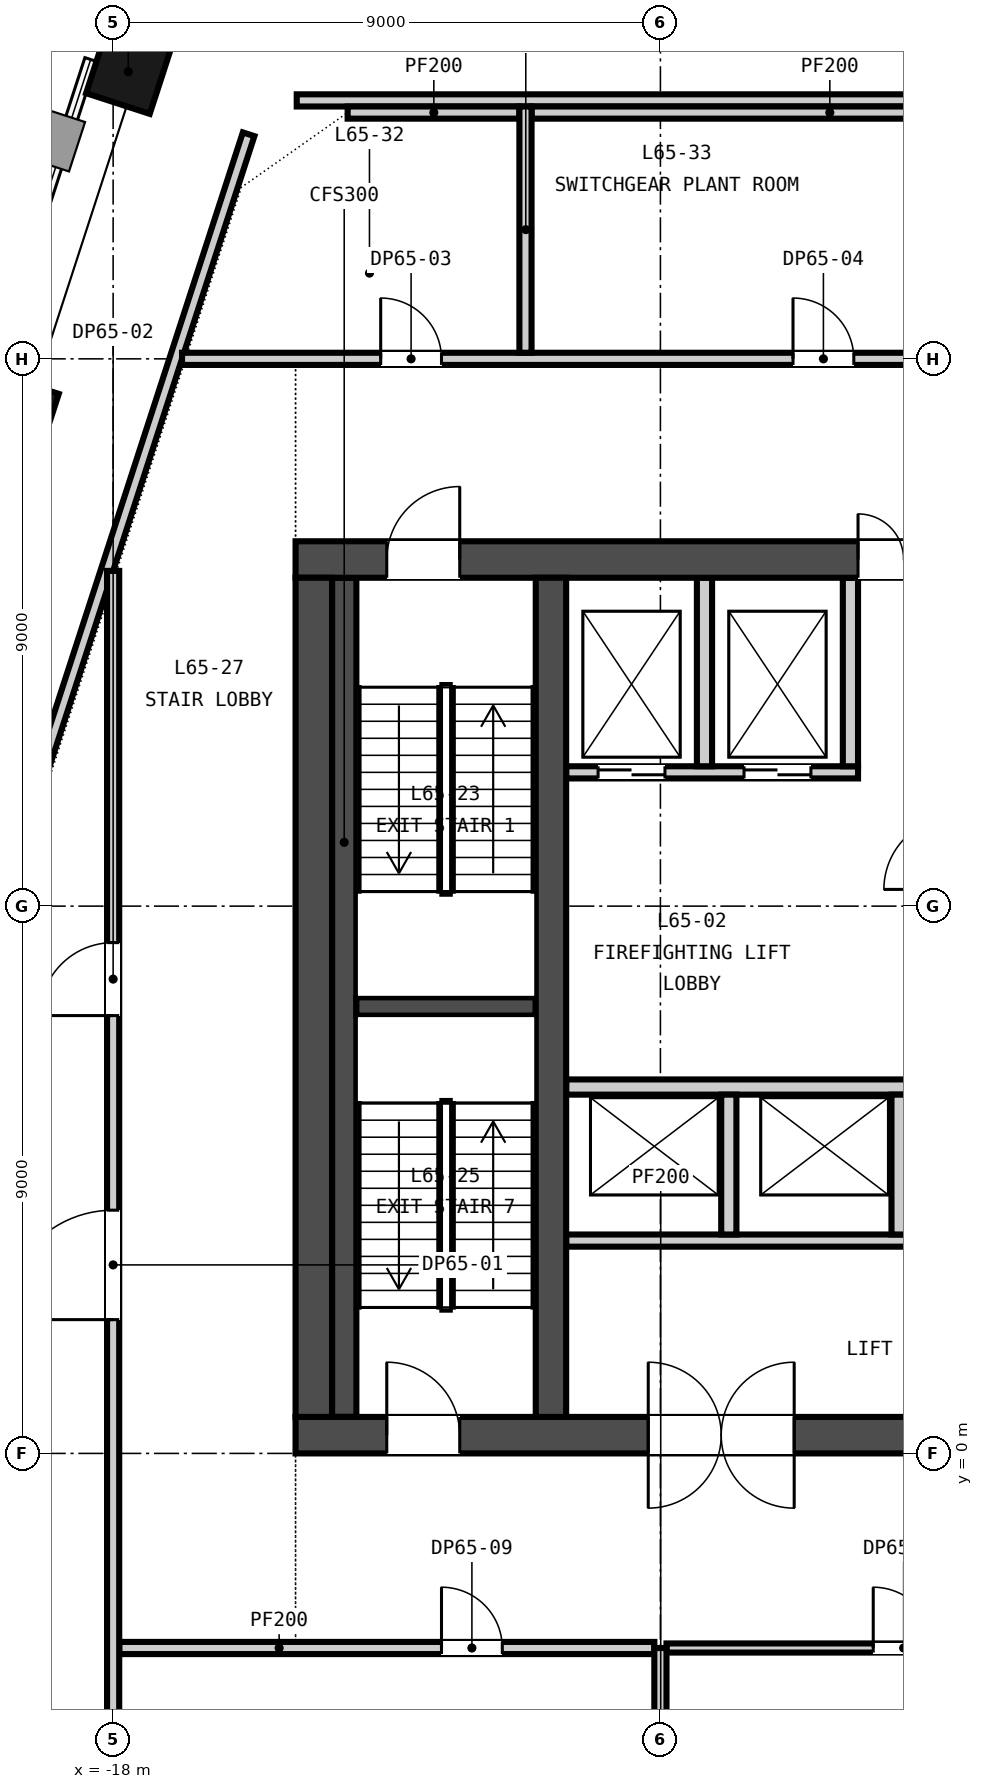
"""IFC4 building model, lengths in metres.
Left out: names, types, materials, properties, quantities, classifications, styles, units other than length and angle.
Written with IfcOpenShell. Run it as: python <this file> out.ifc"""

import sys

from ifc_helpers import new_model, si_unit, direction, frame, frame_2d, origin, origin_2d, place, context, subcontext, project, spatial, rectangle, extrude, element, fill, save


model = new_model("IFC4")
c1 = context("Model", 3, precision=1e-05, world=origin(), true_north=direction((0.0, 1.0)))
c2 = subcontext(c1, "Body", "Model", "MODEL_VIEW")
j1 = project(units=[si_unit("LENGTHUNIT", "METRE"), si_unit("PLANEANGLEUNIT", "RADIAN")], contexts=[c1])
p1 = place(None, origin())
s1 = spatial("IfcSite", under=j1, at=p1, CompositionType="ELEMENT")
p2 = place(p1, origin())
s2 = spatial("IfcBuilding", under=s1, at=p2, CompositionType="ELEMENT")
p3 = place(p2, frame((0.0, 0.0, 256.45)))
s3 = spatial("IfcBuildingStorey", under=s2, at=p3, CompositionType="ELEMENT", Elevation=256.45)
p4 = place(p3, frame((-15.0, 0.3, -0.3), z_axis=(0.0, 0.0, 1.0), x_axis=(1.0, 0.0, 0.0)))
e1 = element("IfcWall", 1, at=p4, inside=s3, PredefinedType="SOLIDWALL", context=c2, shape_type="SweptSolid", body=[
    extrude(rectangle(XDim=30.0, YDim=0.6, at=frame_2d((15.0, 0.0))), origin(), (0.0, 0.0, 1.0), 4.65),
])
p5 = place(p4, frame((5.8, 0.0, 0.3)))
e2 = element("IfcOpeningElement", 2, at=p5, cuts=e1, PredefinedType="OPENING", context=c2, shape_type="SweptSolid", body=[
    extrude(rectangle(XDim=2.4, YDim=2.4, at=frame_2d((1.2, 1.2))), frame((0.0, 0.31, 0.0), z_axis=(0.0, -1.0, 0.0), x_axis=(1.0, 0.0, 0.0)), (0.0, 0.0, 1.0), 0.62),
])
p6 = place(p4, frame((13.8, 0.0, 0.3)))
e3 = element("IfcOpeningElement", 3, at=p6, cuts=e1, PredefinedType="OPENING", context=c2, shape_type="SweptSolid", body=[
    extrude(rectangle(XDim=2.4, YDim=2.4, at=frame_2d((1.2, 1.2))), frame((0.0, 0.31, 0.0), z_axis=(0.0, -1.0, 0.0), x_axis=(1.0, 0.0, 0.0)), (0.0, 0.0, 1.0), 0.62),
])
p7 = place(p4, frame((21.8, 0.0, 0.3)))
e4 = element("IfcOpeningElement", 4, at=p7, cuts=e1, PredefinedType="OPENING", context=c2, shape_type="SweptSolid", body=[
    extrude(rectangle(XDim=2.4, YDim=2.4, at=frame_2d((1.2, 1.2))), frame((0.0, 0.31, 0.0), z_axis=(0.0, -1.0, 0.0), x_axis=(1.0, 0.0, 0.0)), (0.0, 0.0, 1.0), 0.62),
])
p8 = place(p4, frame((1.5, 0.0, 0.3)))
e5 = element("IfcOpeningElement", 5, at=p8, cuts=e1, PredefinedType="OPENING", context=c2, shape_type="SweptSolid", body=[
    extrude(rectangle(XDim=1.2, YDim=2.1, at=frame_2d((0.6, 1.05))), frame((0.0, 0.31, 0.0), z_axis=(0.0, -1.0, 0.0), x_axis=(1.0, 0.0, 0.0)), (0.0, 0.0, 1.0), 0.62),
])
p9 = place(p4, frame((27.3, 0.0, 0.3)))
e6 = element("IfcOpeningElement", 6, at=p9, cuts=e1, PredefinedType="OPENING", context=c2, shape_type="SweptSolid", body=[
    extrude(rectangle(XDim=1.2, YDim=2.1, at=frame_2d((0.6, 1.05))), frame((0.0, 0.31, 0.0), z_axis=(0.0, -1.0, 0.0), x_axis=(1.0, 0.0, 0.0)), (0.0, 0.0, 1.0), 0.62),
])
p10 = place(p3, frame((-15.0, 14.7, -0.3), z_axis=(0.0, 0.0, 1.0), x_axis=(1.0, 0.0, 0.0)))
e7 = element("IfcWall", 7, at=p10, inside=s3, PredefinedType="SOLIDWALL", context=c2, shape_type="SweptSolid", body=[
    extrude(rectangle(XDim=30.0, YDim=0.6, at=frame_2d((15.0, 0.0))), origin(), (0.0, 0.0, 1.0), 4.65),
])
p11 = place(p10, frame((9.25, 0.0, 0.3)))
e8 = element("IfcOpeningElement", 8, at=p11, cuts=e7, PredefinedType="OPENING", context=c2, shape_type="SweptSolid", body=[
    extrude(rectangle(XDim=1.5, YDim=2.1, at=frame_2d((0.75, 1.05))), frame((0.0, 0.31, 0.0), z_axis=(0.0, -1.0, 0.0), x_axis=(1.0, 0.0, 0.0)), (0.0, 0.0, 1.0), 0.62),
])
p12 = place(p10, frame((19.4, 0.0, 0.3)))
e9 = element("IfcOpeningElement", 9, at=p12, cuts=e7, PredefinedType="OPENING", context=c2, shape_type="SweptSolid", body=[
    extrude(rectangle(XDim=1.5, YDim=2.1, at=frame_2d((0.75, 1.05))), frame((0.0, 0.31, 0.0), z_axis=(0.0, -1.0, 0.0), x_axis=(1.0, 0.0, 0.0)), (0.0, 0.0, 1.0), 0.62),
])
p13 = place(p10, frame((1.5, 0.0, 0.3)))
e10 = element("IfcOpeningElement", 10, at=p13, cuts=e7, PredefinedType="OPENING", context=c2, shape_type="SweptSolid", body=[
    extrude(rectangle(XDim=1.2, YDim=2.1, at=frame_2d((0.6, 1.05))), frame((0.0, 0.31, 0.0), z_axis=(0.0, -1.0, 0.0), x_axis=(1.0, 0.0, 0.0)), (0.0, 0.0, 1.0), 0.62),
])
p14 = place(p10, frame((27.3, 0.0, 0.3)))
e11 = element("IfcOpeningElement", 11, at=p14, cuts=e7, PredefinedType="OPENING", context=c2, shape_type="SweptSolid", body=[
    extrude(rectangle(XDim=1.2, YDim=2.1, at=frame_2d((0.6, 1.05))), frame((0.0, 0.31, 0.0), z_axis=(0.0, -1.0, 0.0), x_axis=(1.0, 0.0, 0.0)), (0.0, 0.0, 1.0), 0.62),
])
p15 = place(p3, frame((-14.7, 0.6, -0.3), z_axis=(0.0, 0.0, 1.0), x_axis=(0.0, 1.0, 0.0)))
e12 = element("IfcWall", 12, at=p15, inside=s3, PredefinedType="SOLIDWALL", context=c2, shape_type="SweptSolid", body=[
    extrude(rectangle(XDim=13.8, YDim=0.6, at=frame_2d((6.9, 0.0))), origin(), (0.0, 0.0, 1.0), 4.65),
])
p16 = place(p3, frame((-10.8, 0.6, -0.3), z_axis=(0.0, 0.0, 1.0), x_axis=(0.0, 1.0, 0.0)))
e13 = element("IfcWall", 13, at=p16, inside=s3, PredefinedType="SOLIDWALL", context=c2, shape_type="SweptSolid", body=[
    extrude(rectangle(XDim=13.8, YDim=0.5, at=frame_2d((6.9, 0.0))), origin(), (0.0, 0.0, 1.0), 4.65),
])
for number, where, z_axis, x_axis in (
    (14, (-17.751, 22.722, -0.3), (0.0, 0.0, 1.0), (-0.309, -0.951, 0.0)),
    (15, (-19.587, 17.071, -0.3), (0.0, 0.0, 1.0), (-0.309, -0.951, 0.0)),
):
    element("IfcColumn", number, at=place(p3, frame(where, z_axis=z_axis, x_axis=x_axis)), inside=s3, PredefinedType="COLUMN", context=c2, shape_type="SweptSolid", body=[
        extrude(rectangle(XDim=1.1, YDim=1.1, at=origin_2d()), origin(), (0.0, 0.0, 1.0), 4.65),
    ])
p17 = place(p3, frame((-10.55, 3.5, 0.0), z_axis=(0.0, 0.0, 1.0), x_axis=(1.0, 0.0, 0.0)))
e16 = element("IfcWall", 16, at=p17, inside=s3, PredefinedType="PARTITIONING", context=c2, shape_type="SweptSolid", body=[
    extrude(rectangle(XDim=21.1, YDim=0.2, at=frame_2d((10.55, 0.0))), origin(), (0.0, 0.0, 1.0), 4.35),
])
p18 = place(p17, frame((19.9, 0.0, 0.0)))
e17 = element("IfcOpeningElement", 17, at=p18, cuts=e16, PredefinedType="OPENING", context=c2, shape_type="SweptSolid", body=[
    extrude(rectangle(XDim=0.9, YDim=2.1, at=frame_2d((0.45, 1.05))), frame((0.0, 0.11, 0.0), z_axis=(0.0, -1.0, 0.0), x_axis=(1.0, 0.0, 0.0)), (0.0, 0.0, 1.0), 0.22),
])
p19 = place(p3, frame((-10.55, 6.025, 0.0), z_axis=(0.0, 0.0, 1.0), x_axis=(1.0, 0.0, 0.0)))
e18 = element("IfcWall", 18, at=p19, inside=s3, PredefinedType="PARTITIONING", context=c2, shape_type="SweptSolid", body=[
    extrude(rectangle(XDim=21.1, YDim=0.25, at=frame_2d((10.55, 0.0))), origin(), (0.0, 0.0, 1.0), 4.35),
])
p20 = place(p3, frame((-10.55, 11.2, 0.0), z_axis=(0.0, 0.0, 1.0), x_axis=(1.0, 0.0, 0.0)))
e19 = element("IfcWall", 19, at=p20, inside=s3, PredefinedType="PARTITIONING", context=c2, shape_type="SweptSolid", body=[
    extrude(rectangle(XDim=4.8, YDim=0.2, at=frame_2d((2.4, 0.0))), origin(), (0.0, 0.0, 1.0), 4.35),
])
p21 = place(p20, frame((0.525, 0.0, 0.0)))
e20 = element("IfcOpeningElement", 20, at=p21, cuts=e19, PredefinedType="OPENING", context=c2, shape_type="SweptSolid", body=[
    extrude(rectangle(XDim=1.1, YDim=2.1, at=frame_2d((0.55, 1.05))), frame((0.0, 0.11, 0.0), z_axis=(0.0, -1.0, 0.0), x_axis=(1.0, 0.0, 0.0)), (0.0, 0.0, 1.0), 0.22),
])
p22 = place(p20, frame((2.925, 0.0, 0.0)))
e21 = element("IfcOpeningElement", 21, at=p22, cuts=e19, PredefinedType="OPENING", context=c2, shape_type="SweptSolid", body=[
    extrude(rectangle(XDim=1.1, YDim=2.1, at=frame_2d((0.55, 1.05))), frame((0.0, 0.11, 0.0), z_axis=(0.0, -1.0, 0.0), x_axis=(1.0, 0.0, 0.0)), (0.0, 0.0, 1.0), 0.22),
])
for number, where, z_axis, x_axis in (
    (22, (-7.875, 3.6, 0.0), (0.0, 0.0, 1.0), (0.0, 1.0, 0.0)),
    (23, (-5.075, 3.6, 0.0), (0.0, 0.0, 1.0), (0.0, 1.0, 0.0)),
):
    element("IfcWall", number, at=place(p3, frame(where, z_axis=z_axis, x_axis=x_axis)), inside=s3, PredefinedType="PARTITIONING", context=c2, shape_type="SweptSolid", body=[
        extrude(rectangle(XDim=2.3, YDim=0.25, at=frame_2d((1.15, 0.0))), origin(), (0.0, 0.0, 1.0), 4.35),
    ])
for number, where, z_axis, x_axis in (
    (24, (-8.275, 11.3, 0.0), (0.0, 0.0, 1.0), (0.0, 1.0, 0.0)),
    (25, (-5.875, 11.3, 0.0), (0.0, 0.0, 1.0), (0.0, 1.0, 0.0)),
):
    element("IfcWall", number, at=place(p3, frame(where, z_axis=z_axis, x_axis=x_axis)), inside=s3, PredefinedType="PARTITIONING", context=c2, shape_type="SweptSolid", body=[
        extrude(rectangle(XDim=3.1, YDim=0.25, at=frame_2d((1.55, 0.0))), origin(), (0.0, 0.0, 1.0), 4.35),
    ])
p23 = place(p3, frame((-14.0, 7.35, 0.0), z_axis=(0.0, 0.0, 1.0), x_axis=(1.0, 0.0, 0.0)))
e26 = element("IfcWall", 26, at=p23, inside=s3, PredefinedType="SOLIDWALL", context=c2, shape_type="SweptSolid", body=[
    extrude(rectangle(XDim=2.95, YDim=0.3, at=frame_2d((1.475, 0.0))), origin(), (0.0, 0.0, 1.0), 4.35),
])
p24 = place(p3, frame((-14.2, 0.6, 0.0), z_axis=(0.0, 0.0, 1.0), x_axis=(0.0, 1.0, 0.0)))
e27 = element("IfcWall", 27, at=p24, inside=s3, PredefinedType="SOLIDWALL", context=c2, shape_type="SweptSolid", body=[
    extrude(rectangle(XDim=13.8, YDim=0.4, at=frame_2d((6.9, 0.0))), origin(), (0.0, 0.0, 1.0), 4.35),
])
p25 = place(p3, frame((-17.9, -3.2, 0.0), z_axis=(0.0, 0.0, 1.0), x_axis=(1.0, 0.0, 0.0)))
e28 = element("IfcWall", 28, at=p25, inside=s3, PredefinedType="PARTITIONING", context=c2, shape_type="SweptSolid", body=[
    extrude(rectangle(XDim=8.8, YDim=0.2, at=frame_2d((4.4, 0.0))), origin(), (0.0, 0.0, 1.0), 4.35),
])
p26 = place(p25, frame((5.3, 0.0, 0.0)))
e29 = element("IfcOpeningElement", 29, at=p26, cuts=e28, PredefinedType="OPENING", context=c2, shape_type="SweptSolid", body=[
    extrude(rectangle(XDim=1.0, YDim=2.1, at=frame_2d((0.5, 1.05))), frame((0.0, 0.11, 0.0), z_axis=(0.0, -1.0, 0.0), x_axis=(1.0, 0.0, 0.0)), (0.0, 0.0, 1.0), 0.22),
])
p27 = place(p3, frame((-8.9, -3.2, 0.0), z_axis=(0.0, 0.0, 1.0), x_axis=(1.0, 0.0, 0.0)))
e30 = element("IfcWall", 30, at=p27, inside=s3, PredefinedType="PARTITIONING", context=c2, shape_type="SweptSolid", body=[
    extrude(rectangle(XDim=17.8, YDim=0.15, at=frame_2d((8.9, 0.0))), origin(), (0.0, 0.0, 1.0), 4.35),
])
p28 = place(p27, frame((3.4, 0.0, 0.0)))
e31 = element("IfcOpeningElement", 31, at=p28, cuts=e30, PredefinedType="OPENING", context=c2, shape_type="SweptSolid", body=[
    extrude(rectangle(XDim=1.0, YDim=2.1, at=frame_2d((0.5, 1.05))), frame((0.0, 0.085, 0.0), z_axis=(0.0, -1.0, 0.0), x_axis=(1.0, 0.0, 0.0)), (0.0, 0.0, 1.0), 0.17),
])
p29 = place(p27, frame((12.3, 0.0, 0.0)))
e32 = element("IfcOpeningElement", 32, at=p29, cuts=e30, PredefinedType="OPENING", context=c2, shape_type="SweptSolid", body=[
    extrude(rectangle(XDim=1.0, YDim=2.1, at=frame_2d((0.5, 1.05))), frame((0.0, 0.085, 0.0), z_axis=(0.0, -1.0, 0.0), x_axis=(1.0, 0.0, 0.0)), (0.0, 0.0, 1.0), 0.17),
])
p30 = place(p3, frame((-16.867, 18.0, 0.0), z_axis=(0.0, 0.0, 1.0), x_axis=(1.0, 0.0, 0.0)))
e33 = element("IfcWall", 33, at=p30, inside=s3, PredefinedType="PARTITIONING", context=c2, shape_type="SweptSolid", body=[
    extrude(rectangle(XDim=29.73, YDim=0.2, at=frame_2d((14.865, 0.0))), origin(), (0.0, 0.0, 1.0), 4.35),
])
p31 = place(p30, frame((3.267, 0.0, 0.0)))
e34 = element("IfcOpeningElement", 34, at=p31, cuts=e33, PredefinedType="OPENING", context=c2, shape_type="SweptSolid", body=[
    extrude(rectangle(XDim=1.0, YDim=2.1, at=frame_2d((0.5, 1.05))), frame((0.0, 0.11, 0.0), z_axis=(0.0, -1.0, 0.0), x_axis=(1.0, 0.0, 0.0)), (0.0, 0.0, 1.0), 0.22),
])
p32 = place(p30, frame((10.048, 0.0, 0.0)))
e35 = element("IfcOpeningElement", 35, at=p32, cuts=e33, PredefinedType="OPENING", context=c2, shape_type="SweptSolid", body=[
    extrude(rectangle(XDim=1.0, YDim=2.1, at=frame_2d((0.5, 1.05))), frame((0.0, 0.11, 0.0), z_axis=(0.0, -1.0, 0.0), x_axis=(1.0, 0.0, 0.0)), (0.0, 0.0, 1.0), 0.22),
])
p33 = place(p30, frame((22.048, 0.0, 0.0)))
e36 = element("IfcOpeningElement", 36, at=p33, cuts=e33, PredefinedType="OPENING", context=c2, shape_type="SweptSolid", body=[
    extrude(rectangle(XDim=1.0, YDim=2.1, at=frame_2d((0.5, 1.05))), frame((0.0, 0.11, 0.0), z_axis=(0.0, -1.0, 0.0), x_axis=(1.0, 0.0, 0.0)), (0.0, 0.0, 1.0), 0.22),
])
p34 = place(p3, frame((-14.143, 22.05, 0.0), z_axis=(0.0, 0.0, 1.0), x_axis=(1.0, 0.0, 0.0)))
e37 = element("IfcWall", 37, at=p34, inside=s3, PredefinedType="PARTITIONING", context=c2, shape_type="SweptSolid", body=[
    extrude(rectangle(XDim=2.824, YDim=0.2, at=frame_2d((1.412, 0.0))), origin(), (0.0, 0.0, 1.0), 4.35),
])
p35 = place(p3, frame((-11.119, 22.05, 0.0), z_axis=(0.0, 0.0, 1.0), x_axis=(1.0, 0.0, 0.0)))
e38 = element("IfcWall", 38, at=p35, inside=s3, PredefinedType="PARTITIONING", context=c2, shape_type="SweptSolid", body=[
    extrude(rectangle(XDim=9.8, YDim=0.2, at=frame_2d((4.9, 0.0))), origin(), (0.0, 0.0, 1.0), 4.35),
])
p36 = place(p3, frame((-18.0, -13.123, 0.0), z_axis=(0.0, 0.0, 1.0), x_axis=(0.0, 1.0, 0.0)))
e39 = element("IfcWall", 39, at=p36, inside=s3, PredefinedType="PARTITIONING", context=c2, shape_type="SweptSolid", body=[
    extrude(rectangle(XDim=27.636, YDim=0.2, at=frame_2d((13.818, 0.0))), origin(), (0.0, 0.0, 1.0), 4.35),
])
p37 = place(p36, frame((15.323, 0.0, 0.0)))
e40 = element("IfcOpeningElement", 40, at=p37, cuts=e39, PredefinedType="OPENING", context=c2, shape_type="SweptSolid", body=[
    extrude(rectangle(XDim=1.8, YDim=2.4, at=frame_2d((0.9, 1.2))), frame((0.0, 0.11, 0.0), z_axis=(0.0, -1.0, 0.0), x_axis=(1.0, 0.0, 0.0)), (0.0, 0.0, 1.0), 0.22),
])
p38 = place(p36, frame((20.323, 0.0, 0.0)))
e41 = element("IfcOpeningElement", 41, at=p38, cuts=e39, PredefinedType="OPENING", context=c2, shape_type="SweptSolid", body=[
    extrude(rectangle(XDim=1.2, YDim=2.1, at=frame_2d((0.6, 1.05))), frame((0.0, 0.11, 0.0), z_axis=(0.0, -1.0, 0.0), x_axis=(1.0, 0.0, 0.0)), (0.0, 0.0, 1.0), 0.22),
])
p39 = place(p3, frame((-11.219, 18.1, 0.0), z_axis=(0.0, 0.0, 1.0), x_axis=(0.0, 1.0, 0.0)))
e42 = element("IfcWall", 42, at=p39, inside=s3, PredefinedType="PARTITIONING", context=c2, shape_type="SweptSolid", body=[
    extrude(rectangle(XDim=4.05, YDim=0.2, at=frame_2d((2.025, 0.0))), origin(), (0.0, 0.0, 1.0), 4.35),
])
p40 = place(p3, frame((-9.0, -9.0, 0.0), z_axis=(0.0, 0.0, 1.0), x_axis=(0.0, 1.0, 0.0)))
e43 = element("IfcWall", 43, at=p40, inside=s3, PredefinedType="PARTITIONING", context=c2, shape_type="SweptSolid", body=[
    extrude(rectangle(XDim=5.8, YDim=0.2, at=frame_2d((2.9, 0.0))), origin(), (0.0, 0.0, 1.0), 4.35),
])
p41 = place(p3, frame((-23.322, -1.542, 0.0), z_axis=(0.0, 0.0, 1.0), x_axis=(0.30902054225, 0.951055363513, 0.0)))
e44 = element("IfcWall", 44, at=p41, inside=s3, PredefinedType="PARTITIONING", context=c2, shape_type="SweptSolid", body=[
    extrude(rectangle(XDim=24.431, YDim=0.2, at=frame_2d((12.215, 0.0))), origin(), (0.0, 0.0, 1.0), 4.35),
])
p42 = place(p3, frame((-14.981, 22.25, 0.0), z_axis=(0.0, 0.0, 1.0), x_axis=(1.0, 0.0, 0.0)))
e45 = element("IfcWall", 45, at=p42, inside=s3, PredefinedType="PARTITIONING", context=c2, shape_type="SweptSolid", body=[
    extrude(rectangle(XDim=22.223, YDim=0.2, at=frame_2d((11.111, 0.0))), origin(), (0.0, 0.0, 1.0), 4.35),
])
p43 = place(p21, origin())
e46 = element("IfcDoor", 46, at=p43, inside=s3, OperationType="DOUBLE_DOOR_SLIDING", PredefinedType="DOOR", context=c2, shape_type="SweptSolid", body=[
    extrude(rectangle(XDim=1.1, YDim=2.1, at=frame_2d((0.55, 1.05))), frame((0.0, 0.025, 0.0), z_axis=(0.0, -1.0, 0.0), x_axis=(1.0, 0.0, 0.0)), (0.0, 0.0, 1.0), 0.05),
])
fill(e20, e46)
p44 = place(p22, origin())
e47 = element("IfcDoor", 47, at=p44, inside=s3, OperationType="DOUBLE_DOOR_SLIDING", PredefinedType="DOOR", context=c2, shape_type="SweptSolid", body=[
    extrude(rectangle(XDim=1.1, YDim=2.1, at=frame_2d((0.55, 1.05))), frame((0.0, 0.025, 0.0), z_axis=(0.0, -1.0, 0.0), x_axis=(1.0, 0.0, 0.0)), (0.0, 0.0, 1.0), 0.05),
])
fill(e21, e47)
p45 = place(p5, origin())
e48 = element("IfcDoor", 48, at=p45, inside=s3, OperationType="DOUBLE_DOOR_DOUBLE_SWING", PredefinedType="DOOR", context=c2, shape_type="SweptSolid", body=[
    extrude(rectangle(XDim=2.4, YDim=2.4, at=frame_2d((1.2, 1.2))), frame((0.0, 0.025, 0.0), z_axis=(0.0, -1.0, 0.0), x_axis=(1.0, 0.0, 0.0)), (0.0, 0.0, 1.0), 0.05),
])
fill(e2, e48)
p46 = place(p11, origin())
e49 = element("IfcDoor", 49, at=p46, inside=s3, OperationType="DOUBLE_DOOR_SINGLE_SWING", PredefinedType="DOOR", context=c2, shape_type="SweptSolid", body=[
    extrude(rectangle(XDim=1.5, YDim=2.1, at=frame_2d((0.75, 1.05))), frame((0.0, 0.025, 0.0), z_axis=(0.0, -1.0, 0.0), x_axis=(1.0, 0.0, 0.0)), (0.0, 0.0, 1.0), 0.05),
])
fill(e8, e49)
p47 = place(p13, origin())
e50 = element("IfcDoor", 50, at=p47, inside=s3, OperationType="SINGLE_SWING_RIGHT", PredefinedType="DOOR", context=c2, shape_type="SweptSolid", body=[
    extrude(rectangle(XDim=1.2, YDim=2.1, at=frame_2d((0.6, 1.05))), frame((0.0, 0.025, 0.0), z_axis=(0.0, -1.0, 0.0), x_axis=(1.0, 0.0, 0.0)), (0.0, 0.0, 1.0), 0.05),
])
fill(e10, e50)
p48 = place(p8, origin())
e51 = element("IfcDoor", 51, at=p48, inside=s3, OperationType="SINGLE_SWING_LEFT", PredefinedType="DOOR", context=c2, shape_type="SweptSolid", body=[
    extrude(rectangle(XDim=1.2, YDim=2.1, at=frame_2d((0.6, 1.05))), frame((0.0, 0.025, 0.0), z_axis=(0.0, -1.0, 0.0), x_axis=(1.0, 0.0, 0.0)), (0.0, 0.0, 1.0), 0.05),
])
fill(e5, e51)
p49 = place(p37, origin())
e52 = element("IfcDoor", 52, at=p49, inside=s3, OperationType="SINGLE_SWING_LEFT", PredefinedType="DOOR", context=c2, shape_type="SweptSolid", body=[
    extrude(rectangle(XDim=1.8, YDim=2.4, at=frame_2d((0.9, 1.2))), frame((0.0, 0.025, 0.0), z_axis=(0.0, -1.0, 0.0), x_axis=(1.0, 0.0, 0.0)), (0.0, 0.0, 1.0), 0.05),
])
fill(e40, e52)
p50 = place(p38, origin())
e53 = element("IfcDoor", 53, at=p50, inside=s3, OperationType="SINGLE_SWING_LEFT", PredefinedType="DOOR", context=c2, shape_type="SweptSolid", body=[
    extrude(rectangle(XDim=1.2, YDim=2.1, at=frame_2d((0.6, 1.05))), frame((0.0, 0.025, 0.0), z_axis=(0.0, -1.0, 0.0), x_axis=(1.0, 0.0, 0.0)), (0.0, 0.0, 1.0), 0.05),
])
fill(e41, e53)
p51 = place(p31, origin())
e54 = element("IfcDoor", 54, at=p51, inside=s3, OperationType="SINGLE_SWING_LEFT", PredefinedType="DOOR", context=c2, shape_type="SweptSolid", body=[
    extrude(rectangle(XDim=1.0, YDim=2.1, at=frame_2d((0.5, 1.05))), frame((0.0, 0.025, 0.0), z_axis=(0.0, -1.0, 0.0), x_axis=(1.0, 0.0, 0.0)), (0.0, 0.0, 1.0), 0.05),
])
fill(e34, e54)
p52 = place(p32, origin())
e55 = element("IfcDoor", 55, at=p52, inside=s3, OperationType="SINGLE_SWING_LEFT", PredefinedType="DOOR", context=c2, shape_type="SweptSolid", body=[
    extrude(rectangle(XDim=1.0, YDim=2.1, at=frame_2d((0.5, 1.05))), frame((0.0, 0.025, 0.0), z_axis=(0.0, -1.0, 0.0), x_axis=(1.0, 0.0, 0.0)), (0.0, 0.0, 1.0), 0.05),
])
fill(e35, e55)
p53 = place(p28, origin())
e56 = element("IfcDoor", 56, at=p53, inside=s3, OperationType="SINGLE_SWING_LEFT", PredefinedType="DOOR", context=c2, shape_type="SweptSolid", body=[
    extrude(rectangle(XDim=1.0, YDim=2.1, at=frame_2d((0.5, 1.05))), frame((0.0, 0.025, 0.0), z_axis=(0.0, -1.0, 0.0), x_axis=(1.0, 0.0, 0.0)), (0.0, 0.0, 1.0), 0.05),
])
fill(e31, e56)
p54 = place(p26, origin())
e57 = element("IfcDoor", 57, at=p54, inside=s3, OperationType="SINGLE_SWING_LEFT", PredefinedType="DOOR", context=c2, shape_type="SweptSolid", body=[
    extrude(rectangle(XDim=1.0, YDim=2.1, at=frame_2d((0.5, 1.05))), frame((0.0, 0.025, 0.0), z_axis=(0.0, -1.0, 0.0), x_axis=(1.0, 0.0, 0.0)), (0.0, 0.0, 1.0), 0.05),
])
fill(e29, e57)
save(model, sys.argv[1])
